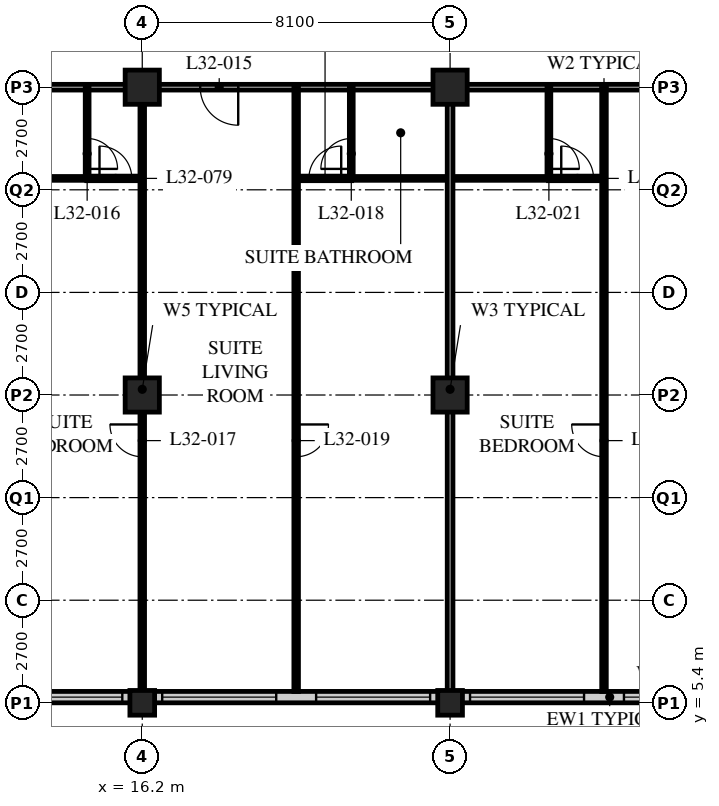
"""IFC4 building model, lengths in metres.
Left out: names, types, materials, properties, quantities, classifications, styles, units other than length and angle.
Written with IfcOpenShell. Run it as: python <this file> out.ifc"""

import sys

from ifc_helpers import new_model, si_unit, direction, frame, frame_2d, origin, origin_2d, place, context, subcontext, project, spatial, rectangle, hollow_rectangle, extrude, element, fill, save


model = new_model("IFC4")
c1 = context("Model", 3, precision=1e-05, world=origin(), true_north=direction((0.0, 1.0)))
c2 = subcontext(c1, "Body", "Model", "MODEL_VIEW")
j1 = project(units=[si_unit("LENGTHUNIT", "METRE"), si_unit("PLANEANGLEUNIT", "RADIAN")], contexts=[c1])
p1 = place(None, origin())
s1 = spatial("IfcSite", under=j1, at=p1, CompositionType="ELEMENT")
p2 = place(p1, origin())
s2 = spatial("IfcBuilding", under=s1, at=p2, CompositionType="ELEMENT")
p3 = place(p2, frame((0.0, 0.0, 127.2)))
s3 = spatial("IfcBuildingStorey", under=s2, at=p3, CompositionType="ELEMENT", Elevation=127.2)
p4 = place(p3, frame((16.2, 5.4, 0.0), z_axis=(0.0, 0.0, 1.0), x_axis=(1.0, 0.0, 0.0)))
e1 = element("IfcColumn", 1, at=p4, inside=s3, PredefinedType="COLUMN", context=c2, shape_type="SweptSolid", body=[
    extrude(hollow_rectangle(XDim=0.65, YDim=0.65, WallThickness=0.055, at=origin_2d()), origin(), (0.0, 0.0, 1.0), 3.4),
])
for number, where, z_axis, x_axis in (
    (2, (16.2, 13.5, 0.0), (0.0, 0.0, 1.0), (1.0, 0.0, 0.0)),
    (3, (16.2, 21.6, 0.0), (0.0, 0.0, 1.0), (1.0, 0.0, 0.0)),
):
    element("IfcColumn", number, at=place(p3, frame(where, z_axis=z_axis, x_axis=x_axis)), inside=s3, PredefinedType="COLUMN", context=c2, shape_type="SweptSolid", body=[
        extrude(hollow_rectangle(XDim=0.9, YDim=0.9, WallThickness=0.09, at=origin_2d()), origin(), (0.0, 0.0, 1.0), 3.4),
    ])
p5 = place(p3, frame((24.3, 5.4, 0.0), z_axis=(0.0, 0.0, 1.0), x_axis=(1.0, 0.0, 0.0)))
e4 = element("IfcColumn", 4, at=p5, inside=s3, PredefinedType="COLUMN", context=c2, shape_type="SweptSolid", body=[
    extrude(hollow_rectangle(XDim=0.65, YDim=0.65, WallThickness=0.055, at=origin_2d()), origin(), (0.0, 0.0, 1.0), 3.4),
])
for number, where, z_axis, x_axis in (
    (5, (24.3, 13.5, 0.0), (0.0, 0.0, 1.0), (1.0, 0.0, 0.0)),
    (6, (24.3, 21.6, 0.0), (0.0, 0.0, 1.0), (1.0, 0.0, 0.0)),
):
    element("IfcColumn", number, at=place(p3, frame(where, z_axis=z_axis, x_axis=x_axis)), inside=s3, PredefinedType="COLUMN", context=c2, shape_type="SweptSolid", body=[
        extrude(hollow_rectangle(XDim=0.9, YDim=0.9, WallThickness=0.09, at=origin_2d()), origin(), (0.0, 0.0, 1.0), 3.4),
    ])
p6 = place(p3, frame((8.4, 5.55, 0.0), z_axis=(0.0, 0.0, 1.0), x_axis=(1.0, 0.0, 0.0)))
e7 = element("IfcWall", 7, at=p6, inside=s3, PredefinedType="SOLIDWALL", context=c2, shape_type="SweptSolid", body=[
    extrude(rectangle(XDim=40.2, YDim=0.3, at=frame_2d((20.1, 0.0))), origin(), (0.0, 0.0, 1.0), 3.19),
])
p7 = place(p6, frame((0.225, 0.0, 0.9)))
e8 = element("IfcOpeningElement", 8, at=p7, cuts=e7, PredefinedType="OPENING", context=c2, shape_type="SweptSolid", body=[
    extrude(rectangle(XDim=3.0, YDim=2.0, at=frame_2d((1.5, 1.0))), frame((0.0, 0.16, 0.0), z_axis=(0.0, -1.0, 0.0), x_axis=(1.0, 0.0, 0.0)), (0.0, 0.0, 1.0), 0.32),
])
p8 = place(p6, frame((4.275, 0.0, 0.9)))
e9 = element("IfcOpeningElement", 9, at=p8, cuts=e7, PredefinedType="OPENING", context=c2, shape_type="SweptSolid", body=[
    extrude(rectangle(XDim=3.0, YDim=2.0, at=frame_2d((1.5, 1.0))), frame((0.0, 0.16, 0.0), z_axis=(0.0, -1.0, 0.0), x_axis=(1.0, 0.0, 0.0)), (0.0, 0.0, 1.0), 0.32),
])
p9 = place(p6, frame((8.325, 0.0, 0.9)))
e10 = element("IfcOpeningElement", 10, at=p9, cuts=e7, PredefinedType="OPENING", context=c2, shape_type="SweptSolid", body=[
    extrude(rectangle(XDim=3.0, YDim=2.0, at=frame_2d((1.5, 1.0))), frame((0.0, 0.16, 0.0), z_axis=(0.0, -1.0, 0.0), x_axis=(1.0, 0.0, 0.0)), (0.0, 0.0, 1.0), 0.32),
])
p10 = place(p6, frame((12.375, 0.0, 0.9)))
e11 = element("IfcOpeningElement", 11, at=p10, cuts=e7, PredefinedType="OPENING", context=c2, shape_type="SweptSolid", body=[
    extrude(rectangle(XDim=3.0, YDim=2.0, at=frame_2d((1.5, 1.0))), frame((0.0, 0.16, 0.0), z_axis=(0.0, -1.0, 0.0), x_axis=(1.0, 0.0, 0.0)), (0.0, 0.0, 1.0), 0.32),
])
p11 = place(p6, frame((16.425, 0.0, 0.9)))
e12 = element("IfcOpeningElement", 12, at=p11, cuts=e7, PredefinedType="OPENING", context=c2, shape_type="SweptSolid", body=[
    extrude(rectangle(XDim=3.0, YDim=2.0, at=frame_2d((1.5, 1.0))), frame((0.0, 0.16, 0.0), z_axis=(0.0, -1.0, 0.0), x_axis=(1.0, 0.0, 0.0)), (0.0, 0.0, 1.0), 0.32),
])
p12 = place(p6, frame((20.475, 0.0, 0.9)))
e13 = element("IfcOpeningElement", 13, at=p12, cuts=e7, PredefinedType="OPENING", context=c2, shape_type="SweptSolid", body=[
    extrude(rectangle(XDim=3.0, YDim=2.0, at=frame_2d((1.5, 1.0))), frame((0.0, 0.16, 0.0), z_axis=(0.0, -1.0, 0.0), x_axis=(1.0, 0.0, 0.0)), (0.0, 0.0, 1.0), 0.32),
])
p13 = place(p6, frame((24.525, 0.0, 0.9)))
e14 = element("IfcOpeningElement", 14, at=p13, cuts=e7, PredefinedType="OPENING", context=c2, shape_type="SweptSolid", body=[
    extrude(rectangle(XDim=3.0, YDim=2.0, at=frame_2d((1.5, 1.0))), frame((0.0, 0.16, 0.0), z_axis=(0.0, -1.0, 0.0), x_axis=(1.0, 0.0, 0.0)), (0.0, 0.0, 1.0), 0.32),
])
p14 = place(p6, frame((28.575, 0.0, 0.9)))
e15 = element("IfcOpeningElement", 15, at=p14, cuts=e7, PredefinedType="OPENING", context=c2, shape_type="SweptSolid", body=[
    extrude(rectangle(XDim=3.0, YDim=2.0, at=frame_2d((1.5, 1.0))), frame((0.0, 0.16, 0.0), z_axis=(0.0, -1.0, 0.0), x_axis=(1.0, 0.0, 0.0)), (0.0, 0.0, 1.0), 0.32),
])
p15 = place(p6, frame((32.625, 0.0, 0.9)))
e16 = element("IfcOpeningElement", 16, at=p15, cuts=e7, PredefinedType="OPENING", context=c2, shape_type="SweptSolid", body=[
    extrude(rectangle(XDim=3.0, YDim=2.0, at=frame_2d((1.5, 1.0))), frame((0.0, 0.16, 0.0), z_axis=(0.0, -1.0, 0.0), x_axis=(1.0, 0.0, 0.0)), (0.0, 0.0, 1.0), 0.32),
])
p16 = place(p6, frame((36.675, 0.0, 0.9)))
e17 = element("IfcOpeningElement", 17, at=p16, cuts=e7, PredefinedType="OPENING", context=c2, shape_type="SweptSolid", body=[
    extrude(rectangle(XDim=3.0, YDim=2.0, at=frame_2d((1.5, 1.0))), frame((0.0, 0.16, 0.0), z_axis=(0.0, -1.0, 0.0), x_axis=(1.0, 0.0, 0.0)), (0.0, 0.0, 1.0), 0.32),
])
p17 = place(p3, frame((8.1, 21.6, 0.0), z_axis=(0.0, 0.0, 1.0), x_axis=(1.0, 0.0, 0.0)))
e18 = element("IfcWall", 18, at=p17, inside=s3, PredefinedType="PARTITIONING", context=c2, shape_type="SweptSolid", body=[
    extrude(rectangle(XDim=40.5, YDim=0.15, at=frame_2d((20.25, 0.0))), origin(), (0.0, 0.0, 1.0), 2.578),
])
p18 = place(p17, frame((9.625, 0.0, 0.0)))
e19 = element("IfcOpeningElement", 19, at=p18, cuts=e18, PredefinedType="OPENING", context=c2, shape_type="SweptSolid", body=[
    extrude(rectangle(XDim=1.0, YDim=2.1, at=frame_2d((0.5, 1.05))), frame((0.0, 0.085, 0.0), z_axis=(0.0, -1.0, 0.0), x_axis=(1.0, 0.0, 0.0)), (0.0, 0.0, 1.0), 0.17),
])
p19 = place(p17, frame((21.775, 0.0, 0.0)))
e20 = element("IfcOpeningElement", 20, at=p19, cuts=e18, PredefinedType="OPENING", context=c2, shape_type="SweptSolid", body=[
    extrude(rectangle(XDim=1.0, YDim=2.1, at=frame_2d((0.5, 1.05))), frame((0.0, 0.085, 0.0), z_axis=(0.0, -1.0, 0.0), x_axis=(1.0, 0.0, 0.0)), (0.0, 0.0, 1.0), 0.17),
])
p20 = place(p17, frame((28.95, 0.0, 0.0)))
e21 = element("IfcOpeningElement", 21, at=p20, cuts=e18, PredefinedType="OPENING", context=c2, shape_type="SweptSolid", body=[
    extrude(rectangle(XDim=1.0, YDim=2.1, at=frame_2d((0.5, 1.05))), frame((0.0, 0.085, 0.0), z_axis=(0.0, -1.0, 0.0), x_axis=(1.0, 0.0, 0.0)), (0.0, 0.0, 1.0), 0.17),
])
p21 = place(p17, frame((34.85, 0.0, 0.0)))
e22 = element("IfcOpeningElement", 22, at=p21, cuts=e18, PredefinedType="OPENING", context=c2, shape_type="SweptSolid", body=[
    extrude(rectangle(XDim=1.0, YDim=2.1, at=frame_2d((0.5, 1.05))), frame((0.0, 0.085, 0.0), z_axis=(0.0, -1.0, 0.0), x_axis=(1.0, 0.0, 0.0)), (0.0, 0.0, 1.0), 0.17),
])
p22 = place(p17, frame((1.525, 0.0, 0.0)))
e23 = element("IfcOpeningElement", 23, at=p22, cuts=e18, PredefinedType="OPENING", context=c2, shape_type="SweptSolid", body=[
    extrude(rectangle(XDim=1.0, YDim=2.1, at=frame_2d((0.5, 1.05))), frame((0.0, 0.085, 0.0), z_axis=(0.0, -1.0, 0.0), x_axis=(1.0, 0.0, 0.0)), (0.0, 0.0, 1.0), 0.17),
])
p23 = place(p17, frame((37.975, 0.0, 0.0)))
e24 = element("IfcOpeningElement", 24, at=p23, cuts=e18, PredefinedType="OPENING", context=c2, shape_type="SweptSolid", body=[
    extrude(rectangle(XDim=1.0, YDim=2.1, at=frame_2d((0.5, 1.05))), frame((0.0, 0.085, 0.0), z_axis=(0.0, -1.0, 0.0), x_axis=(1.0, 0.0, 0.0)), (0.0, 0.0, 1.0), 0.17),
])
p24 = place(p3, frame((12.15, 19.2, 0.0), z_axis=(0.0, 0.0, 1.0), x_axis=(1.0, 0.0, 0.0)))
e25 = element("IfcWall", 25, at=p24, inside=s3, PredefinedType="PARTITIONING", context=c2, shape_type="SweptSolid", body=[
    extrude(rectangle(XDim=2.6, YDim=0.1, at=frame_2d((1.3, 0.0))), origin(), (0.0, 0.0, 1.0), 3.19),
])
p25 = place(p3, frame((14.75, 21.6, 0.0), z_axis=(0.0, 0.0, 1.0), x_axis=(0.0, -1.0, 0.0)))
e26 = element("IfcWall", 26, at=p25, inside=s3, PredefinedType="PARTITIONING", context=c2, shape_type="SweptSolid", body=[
    extrude(rectangle(XDim=2.4, YDim=0.1, at=frame_2d((1.2, 0.0))), origin(), (0.0, 0.0, 1.0), 3.19),
])
p26 = place(p25, frame((1.35, 0.0, 0.0)))
e27 = element("IfcOpeningElement", 27, at=p26, cuts=e26, PredefinedType="OPENING", context=c2, shape_type="SweptSolid", body=[
    extrude(rectangle(XDim=0.8, YDim=2.1, at=frame_2d((0.4, 1.05))), frame((0.0, 0.06, 0.0), z_axis=(0.0, -1.0, 0.0), x_axis=(1.0, 0.0, 0.0)), (0.0, 0.0, 1.0), 0.12),
])
p27 = place(p3, frame((16.2, 21.6, 0.0), z_axis=(0.0, 0.0, 1.0), x_axis=(0.0, -1.0, 0.0)))
e28 = element("IfcWall", 28, at=p27, inside=s3, PredefinedType="PARTITIONING", context=c2, shape_type="SweptSolid", body=[
    extrude(rectangle(XDim=15.9, YDim=0.12, at=frame_2d((7.95, 0.0))), origin(), (0.0, 0.0, 1.0), 2.578),
])
p28 = place(p27, frame((8.875, 0.0, 0.0)))
e29 = element("IfcOpeningElement", 29, at=p28, cuts=e28, PredefinedType="OPENING", context=c2, shape_type="SweptSolid", body=[
    extrude(rectangle(XDim=0.85, YDim=2.1, at=frame_2d((0.425, 1.05))), frame((0.0, 0.07, 0.0), z_axis=(0.0, -1.0, 0.0), x_axis=(1.0, 0.0, 0.0)), (0.0, 0.0, 1.0), 0.14),
])
p29 = place(p3, frame((21.7, 19.2, 0.0), z_axis=(0.0, 0.0, 1.0), x_axis=(1.0, 0.0, 0.0)))
e30 = element("IfcWall", 30, at=p29, inside=s3, PredefinedType="PARTITIONING", context=c2, shape_type="SweptSolid", body=[
    extrude(rectangle(XDim=5.2, YDim=0.1, at=frame_2d((2.6, 0.0))), origin(), (0.0, 0.0, 1.0), 3.19),
])
p30 = place(p3, frame((21.7, 21.6, 0.0), z_axis=(0.0, 0.0, 1.0), x_axis=(0.0, -1.0, 0.0)))
e31 = element("IfcWall", 31, at=p30, inside=s3, PredefinedType="PARTITIONING", context=c2, shape_type="SweptSolid", body=[
    extrude(rectangle(XDim=2.4, YDim=0.1, at=frame_2d((1.2, 0.0))), origin(), (0.0, 0.0, 1.0), 3.19),
])
p31 = place(p30, frame((1.35, 0.0, 0.0)))
e32 = element("IfcOpeningElement", 32, at=p31, cuts=e31, PredefinedType="OPENING", context=c2, shape_type="SweptSolid", body=[
    extrude(rectangle(XDim=0.8, YDim=2.1, at=frame_2d((0.4, 1.05))), frame((0.0, 0.06, 0.0), z_axis=(0.0, -1.0, 0.0), x_axis=(1.0, 0.0, 0.0)), (0.0, 0.0, 1.0), 0.12),
])
p32 = place(p3, frame((20.25, 21.6, 0.0), z_axis=(0.0, 0.0, 1.0), x_axis=(0.0, -1.0, 0.0)))
e33 = element("IfcWall", 33, at=p32, inside=s3, PredefinedType="PARTITIONING", context=c2, shape_type="SweptSolid", body=[
    extrude(rectangle(XDim=15.9, YDim=0.12, at=frame_2d((7.95, 0.0))), origin(), (0.0, 0.0, 1.0), 3.19),
])
p33 = place(p32, frame((8.875, 0.0, 0.0)))
e34 = element("IfcOpeningElement", 34, at=p33, cuts=e33, PredefinedType="OPENING", context=c2, shape_type="SweptSolid", body=[
    extrude(rectangle(XDim=0.85, YDim=2.1, at=frame_2d((0.425, 1.05))), frame((0.0, 0.07, 0.0), z_axis=(0.0, -1.0, 0.0), x_axis=(1.0, 0.0, 0.0)), (0.0, 0.0, 1.0), 0.14),
])
p34 = place(p3, frame((24.3, 21.6, 0.0), z_axis=(0.0, 0.0, 1.0), x_axis=(0.0, -1.0, 0.0)))
e35 = element("IfcWall", 35, at=p34, inside=s3, PredefinedType="PARTITIONING", context=c2, shape_type="SweptSolid", body=[
    extrude(rectangle(XDim=15.9, YDim=0.15, at=frame_2d((7.95, 0.0))), origin(), (0.0, 0.0, 1.0), 2.578),
])
p35 = place(p3, frame((26.9, 21.6, 0.0), z_axis=(0.0, 0.0, 1.0), x_axis=(0.0, -1.0, 0.0)))
e36 = element("IfcWall", 36, at=p35, inside=s3, PredefinedType="PARTITIONING", context=c2, shape_type="SweptSolid", body=[
    extrude(rectangle(XDim=2.4, YDim=0.1, at=frame_2d((1.2, 0.0))), origin(), (0.0, 0.0, 1.0), 3.19),
])
p36 = place(p35, frame((1.35, 0.0, 0.0)))
e37 = element("IfcOpeningElement", 37, at=p36, cuts=e36, PredefinedType="OPENING", context=c2, shape_type="SweptSolid", body=[
    extrude(rectangle(XDim=0.8, YDim=2.1, at=frame_2d((0.4, 1.05))), frame((0.0, 0.06, 0.0), z_axis=(0.0, -1.0, 0.0), x_axis=(1.0, 0.0, 0.0)), (0.0, 0.0, 1.0), 0.12),
])
p37 = place(p3, frame((28.35, 21.6, 0.0), z_axis=(0.0, 0.0, 1.0), x_axis=(0.0, -1.0, 0.0)))
e38 = element("IfcWall", 38, at=p37, inside=s3, PredefinedType="PARTITIONING", context=c2, shape_type="SweptSolid", body=[
    extrude(rectangle(XDim=15.9, YDim=0.12, at=frame_2d((7.95, 0.0))), origin(), (0.0, 0.0, 1.0), 3.19),
])
p38 = place(p37, frame((8.875, 0.0, 0.0)))
e39 = element("IfcOpeningElement", 39, at=p38, cuts=e38, PredefinedType="OPENING", context=c2, shape_type="SweptSolid", body=[
    extrude(rectangle(XDim=0.85, YDim=2.1, at=frame_2d((0.425, 1.05))), frame((0.0, 0.07, 0.0), z_axis=(0.0, -1.0, 0.0), x_axis=(1.0, 0.0, 0.0)), (0.0, 0.0, 1.0), 0.14),
])
p39 = place(p3, frame((16.2, 19.2, 0.0), z_axis=(0.0, 0.0, 1.0), x_axis=(-1.0, 0.0, 0.0)))
e40 = element("IfcWall", 40, at=p39, inside=s3, PredefinedType="PARTITIONING", context=c2, shape_type="SweptSolid", body=[
    extrude(rectangle(XDim=1.46, YDim=0.12, at=frame_2d((0.73, 0.0))), origin(), (0.0, 0.0, 1.0), 3.19),
])
p40 = place(p39, frame((0.275, 0.0, 0.0)))
e41 = element("IfcOpeningElement", 41, at=p40, cuts=e40, PredefinedType="OPENING", context=c2, shape_type="SweptSolid", body=[
    extrude(rectangle(XDim=0.85, YDim=2.1, at=frame_2d((0.425, 1.05))), frame((0.0, 0.07, 0.0), z_axis=(0.0, -1.0, 0.0), x_axis=(1.0, 0.0, 0.0)), (0.0, 0.0, 1.0), 0.14),
])
p41 = place(p3, frame((21.71, 19.2, 0.0), z_axis=(0.0, 0.0, 1.0), x_axis=(-1.0, 0.0, 0.0)))
e42 = element("IfcWall", 42, at=p41, inside=s3, PredefinedType="PARTITIONING", context=c2, shape_type="SweptSolid", body=[
    extrude(rectangle(XDim=1.46, YDim=0.12, at=frame_2d((0.73, 0.0))), origin(), (0.0, 0.0, 1.0), 3.19),
])
p42 = place(p41, frame((0.275, 0.0, 0.0)))
e43 = element("IfcOpeningElement", 43, at=p42, cuts=e42, PredefinedType="OPENING", context=c2, shape_type="SweptSolid", body=[
    extrude(rectangle(XDim=0.85, YDim=2.1, at=frame_2d((0.425, 1.05))), frame((0.0, 0.07, 0.0), z_axis=(0.0, -1.0, 0.0), x_axis=(1.0, 0.0, 0.0)), (0.0, 0.0, 1.0), 0.14),
])
p43 = place(p3, frame((28.35, 19.2, 0.0), z_axis=(0.0, 0.0, 1.0), x_axis=(-1.0, 0.0, 0.0)))
e44 = element("IfcWall", 44, at=p43, inside=s3, PredefinedType="PARTITIONING", context=c2, shape_type="SweptSolid", body=[
    extrude(rectangle(XDim=1.46, YDim=0.12, at=frame_2d((0.73, 0.0))), origin(), (0.0, 0.0, 1.0), 3.19),
])
p44 = place(p43, frame((0.275, 0.0, 0.0)))
e45 = element("IfcOpeningElement", 45, at=p44, cuts=e44, PredefinedType="OPENING", context=c2, shape_type="SweptSolid", body=[
    extrude(rectangle(XDim=0.85, YDim=2.1, at=frame_2d((0.425, 1.05))), frame((0.0, 0.07, 0.0), z_axis=(0.0, -1.0, 0.0), x_axis=(1.0, 0.0, 0.0)), (0.0, 0.0, 1.0), 0.14),
])
p45 = place(p8, origin())
e46 = element("IfcWindow", 46, at=p45, inside=s3, PartitioningType="SINGLE_PANEL", PredefinedType="WINDOW", context=c2, shape_type="SweptSolid", body=[
    extrude(rectangle(XDim=3.0, YDim=2.0, at=frame_2d((1.5, 1.0))), frame((0.0, 0.03, 0.0), z_axis=(0.0, -1.0, 0.0), x_axis=(1.0, 0.0, 0.0)), (0.0, 0.0, 1.0), 0.06),
])
fill(e9, e46)
p46 = place(p9, origin())
e47 = element("IfcWindow", 47, at=p46, inside=s3, PartitioningType="SINGLE_PANEL", PredefinedType="WINDOW", context=c2, shape_type="SweptSolid", body=[
    extrude(rectangle(XDim=3.0, YDim=2.0, at=frame_2d((1.5, 1.0))), frame((0.0, 0.03, 0.0), z_axis=(0.0, -1.0, 0.0), x_axis=(1.0, 0.0, 0.0)), (0.0, 0.0, 1.0), 0.06),
])
fill(e10, e47)
p47 = place(p10, origin())
e48 = element("IfcWindow", 48, at=p47, inside=s3, PartitioningType="SINGLE_PANEL", PredefinedType="WINDOW", context=c2, shape_type="SweptSolid", body=[
    extrude(rectangle(XDim=3.0, YDim=2.0, at=frame_2d((1.5, 1.0))), frame((0.0, 0.03, 0.0), z_axis=(0.0, -1.0, 0.0), x_axis=(1.0, 0.0, 0.0)), (0.0, 0.0, 1.0), 0.06),
])
fill(e11, e48)
p48 = place(p11, origin())
e49 = element("IfcWindow", 49, at=p48, inside=s3, PartitioningType="SINGLE_PANEL", PredefinedType="WINDOW", context=c2, shape_type="SweptSolid", body=[
    extrude(rectangle(XDim=3.0, YDim=2.0, at=frame_2d((1.5, 1.0))), frame((0.0, 0.03, 0.0), z_axis=(0.0, -1.0, 0.0), x_axis=(1.0, 0.0, 0.0)), (0.0, 0.0, 1.0), 0.06),
])
fill(e12, e49)
p49 = place(p12, origin())
e50 = element("IfcWindow", 50, at=p49, inside=s3, PartitioningType="SINGLE_PANEL", PredefinedType="WINDOW", context=c2, shape_type="SweptSolid", body=[
    extrude(rectangle(XDim=3.0, YDim=2.0, at=frame_2d((1.5, 1.0))), frame((0.0, 0.03, 0.0), z_axis=(0.0, -1.0, 0.0), x_axis=(1.0, 0.0, 0.0)), (0.0, 0.0, 1.0), 0.06),
])
fill(e13, e50)
p50 = place(p18, origin())
e51 = element("IfcDoor", 51, at=p50, inside=s3, OperationType="SINGLE_SWING_LEFT", PredefinedType="DOOR", context=c2, shape_type="SweptSolid", body=[
    extrude(rectangle(XDim=1.0, YDim=2.1, at=frame_2d((0.5, 1.05))), frame((0.0, 0.025, 0.0), z_axis=(0.0, -1.0, 0.0), x_axis=(1.0, 0.0, 0.0)), (0.0, 0.0, 1.0), 0.05),
])
fill(e19, e51)
p51 = place(p26, origin())
e52 = element("IfcDoor", 52, at=p51, inside=s3, OperationType="SINGLE_SWING_RIGHT", PredefinedType="DOOR", context=c2, shape_type="SweptSolid", body=[
    extrude(rectangle(XDim=0.8, YDim=2.1, at=frame_2d((0.4, 1.05))), frame((0.0, 0.025, 0.0), z_axis=(0.0, -1.0, 0.0), x_axis=(1.0, 0.0, 0.0)), (0.0, 0.0, 1.0), 0.05),
])
fill(e27, e52)
p52 = place(p28, origin())
e53 = element("IfcDoor", 53, at=p52, inside=s3, OperationType="SINGLE_SWING_RIGHT", PredefinedType="DOOR", context=c2, shape_type="SweptSolid", body=[
    extrude(rectangle(XDim=0.85, YDim=2.1, at=frame_2d((0.425, 1.05))), frame((0.0, 0.025, 0.0), z_axis=(0.0, -1.0, 0.0), x_axis=(1.0, 0.0, 0.0)), (0.0, 0.0, 1.0), 0.05),
])
fill(e29, e53)
p53 = place(p31, origin())
e54 = element("IfcDoor", 54, at=p53, inside=s3, OperationType="SINGLE_SWING_LEFT", PredefinedType="DOOR", context=c2, shape_type="SweptSolid", body=[
    extrude(rectangle(XDim=0.8, YDim=2.1, at=frame_2d((0.4, 1.05))), frame((0.0, 0.025, 0.0), z_axis=(0.0, -1.0, 0.0), x_axis=(1.0, 0.0, 0.0)), (0.0, 0.0, 1.0), 0.05),
])
fill(e32, e54)
p54 = place(p33, origin())
e55 = element("IfcDoor", 55, at=p54, inside=s3, OperationType="SINGLE_SWING_LEFT", PredefinedType="DOOR", context=c2, shape_type="SweptSolid", body=[
    extrude(rectangle(XDim=0.85, YDim=2.1, at=frame_2d((0.425, 1.05))), frame((0.0, 0.025, 0.0), z_axis=(0.0, -1.0, 0.0), x_axis=(1.0, 0.0, 0.0)), (0.0, 0.0, 1.0), 0.05),
])
fill(e34, e55)
p55 = place(p36, origin())
e56 = element("IfcDoor", 56, at=p55, inside=s3, OperationType="SINGLE_SWING_RIGHT", PredefinedType="DOOR", context=c2, shape_type="SweptSolid", body=[
    extrude(rectangle(XDim=0.8, YDim=2.1, at=frame_2d((0.4, 1.05))), frame((0.0, 0.025, 0.0), z_axis=(0.0, -1.0, 0.0), x_axis=(1.0, 0.0, 0.0)), (0.0, 0.0, 1.0), 0.05),
])
fill(e37, e56)
p56 = place(p38, origin())
e57 = element("IfcDoor", 57, at=p56, inside=s3, OperationType="SINGLE_SWING_RIGHT", PredefinedType="DOOR", context=c2, shape_type="SweptSolid", body=[
    extrude(rectangle(XDim=0.85, YDim=2.1, at=frame_2d((0.425, 1.05))), frame((0.0, 0.025, 0.0), z_axis=(0.0, -1.0, 0.0), x_axis=(1.0, 0.0, 0.0)), (0.0, 0.0, 1.0), 0.05),
])
fill(e39, e57)
p57 = place(p40, origin())
e58 = element("IfcDoor", 58, at=p57, inside=s3, OperationType="SINGLE_SWING_LEFT", PredefinedType="DOOR", context=c2, shape_type="SweptSolid", body=[
    extrude(rectangle(XDim=0.85, YDim=2.1, at=frame_2d((0.425, 1.05))), frame((0.0, 0.025, 0.0), z_axis=(0.0, -1.0, 0.0), x_axis=(1.0, 0.0, 0.0)), (0.0, 0.0, 1.0), 0.05),
])
fill(e41, e58)
p58 = place(p42, origin())
e59 = element("IfcDoor", 59, at=p58, inside=s3, OperationType="SINGLE_SWING_RIGHT", PredefinedType="DOOR", context=c2, shape_type="SweptSolid", body=[
    extrude(rectangle(XDim=0.85, YDim=2.1, at=frame_2d((0.425, 1.05))), frame((0.0, 0.025, 0.0), z_axis=(0.0, -1.0, 0.0), x_axis=(1.0, 0.0, 0.0)), (0.0, 0.0, 1.0), 0.05),
])
fill(e43, e59)
p59 = place(p44, origin())
e60 = element("IfcDoor", 60, at=p59, inside=s3, OperationType="SINGLE_SWING_LEFT", PredefinedType="DOOR", context=c2, shape_type="SweptSolid", body=[
    extrude(rectangle(XDim=0.85, YDim=2.1, at=frame_2d((0.425, 1.05))), frame((0.0, 0.025, 0.0), z_axis=(0.0, -1.0, 0.0), x_axis=(1.0, 0.0, 0.0)), (0.0, 0.0, 1.0), 0.05),
])
fill(e45, e60)
save(model, sys.argv[1])
